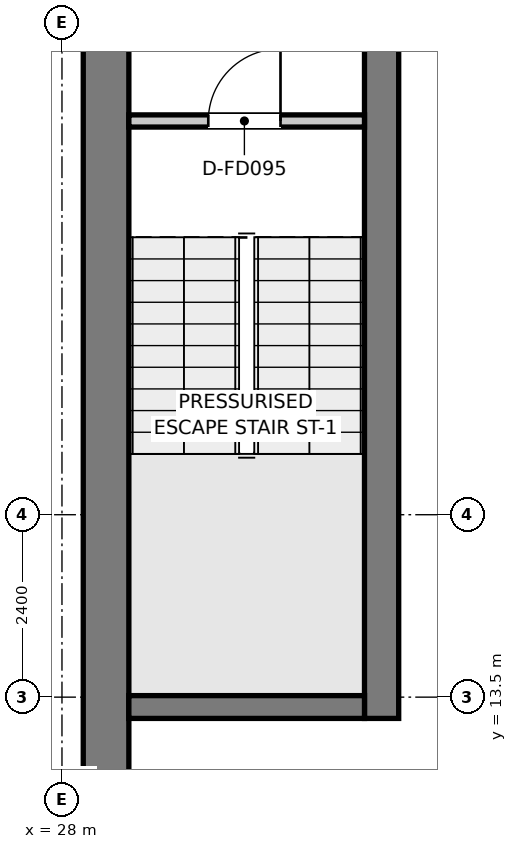
"""IFC4 building model, lengths in metres.
Left out: names, types, materials, properties, quantities, classifications, styles, units other than length and angle.
Written with IfcOpenShell. Run it as: python <this file> out.ifc"""

import sys

from ifc_helpers import new_model, si_unit, direction, frame, frame_2d, origin, place, context, subcontext, project, spatial, rectangle, extrude, element, fill, save


model = new_model("IFC4")
c1 = context("Model", 3, precision=1e-05, world=origin(), true_north=direction((0.0, 1.0)))
c2 = subcontext(c1, "Body", "Model", "MODEL_VIEW")
j1 = project(units=[si_unit("LENGTHUNIT", "METRE"), si_unit("PLANEANGLEUNIT", "RADIAN")], contexts=[c1])
p1 = place(None, origin())
s1 = spatial("IfcSite", under=j1, at=p1, CompositionType="ELEMENT")
p2 = place(p1, origin())
s2 = spatial("IfcBuilding", under=s1, at=p2, CompositionType="ELEMENT")
p3 = place(p2, frame((0.0, 0.0, 378.25)))
s3 = spatial("IfcBuildingStorey", under=s2, at=p3, CompositionType="ELEMENT", Elevation=378.25)
p4 = place(p3, frame((28.58, 11.1, 0.0), z_axis=(0.0, 0.0, 1.0), x_axis=(0.0, 1.0, 0.0)))
e1 = element("IfcWall", 1, at=p4, inside=s3, PredefinedType="SHEAR", context=c2, shape_type="SweptSolid", body=[
    extrude(rectangle(XDim=15.1, YDim=0.6, at=frame_2d((7.55, 0.0))), origin(), (0.0, 0.0, 1.0), 3.6),
])
p5 = place(p3, frame((32.205, 13.22, 0.0), z_axis=(0.0, 0.0, 1.0), x_axis=(0.0, 1.0, 0.0)))
e2 = element("IfcWall", 2, at=p5, inside=s3, PredefinedType="SHEAR", context=c2, shape_type="SweptSolid", body=[
    extrude(rectangle(XDim=12.98, YDim=0.45, at=frame_2d((6.49, 0.0))), origin(), (0.0, 0.0, 1.0), 3.6),
])
p6 = place(p5, frame((10.58, 0.0, 0.0)))
e3 = element("IfcOpeningElement", 3, at=p6, cuts=e2, PredefinedType="OPENING", context=c2, shape_type="SweptSolid", body=[
    extrude(rectangle(XDim=1.1, YDim=2.15, at=frame_2d((0.55, 1.075))), frame((0.0, 0.235, 0.0), z_axis=(0.0, -1.0, 0.0), x_axis=(1.0, 0.0, 0.0)), (0.0, 0.0, 1.0), 0.47),
])
p7 = place(p3, frame((28.88, 13.37, 0.0), z_axis=(0.0, 0.0, 1.0), x_axis=(1.0, 0.0, 0.0)))
e4 = element("IfcWall", 4, at=p7, inside=s3, PredefinedType="SHEAR", context=c2, shape_type="SweptSolid", body=[
    extrude(rectangle(XDim=3.1, YDim=0.3, at=frame_2d((1.55, 0.0))), origin(), (0.0, 0.0, 1.0), 3.6),
])
p8 = place(p3, frame((28.88, 21.08, 0.0), z_axis=(0.0, 0.0, 1.0), x_axis=(1.0, 0.0, 0.0)))
e5 = element("IfcWall", 5, at=p8, inside=s3, PredefinedType="PARTITIONING", context=c2, shape_type="SweptSolid", body=[
    extrude(rectangle(XDim=3.1, YDim=0.16, at=frame_2d((1.55, 0.0))), origin(), (0.0, 0.0, 1.0), 3.3),
])
p9 = place(p8, frame((1.045, 0.0, 0.0)))
e6 = element("IfcOpeningElement", 6, at=p9, cuts=e5, PredefinedType="OPENING", context=c2, shape_type="SweptSolid", body=[
    extrude(rectangle(XDim=0.95, YDim=2.1, at=frame_2d((0.475, 1.05))), frame((0.0, 0.09, 0.0), z_axis=(0.0, -1.0, 0.0), x_axis=(1.0, 0.0, 0.0)), (0.0, 0.0, 1.0), 0.18),
])
p10 = place(p9, origin())
e7 = element("IfcDoor", 7, at=p10, inside=s3, OperationType="SINGLE_SWING_RIGHT", PredefinedType="DOOR", context=c2, shape_type="SweptSolid", body=[
    extrude(rectangle(XDim=0.95, YDim=2.1, at=frame_2d((0.475, 1.05))), frame((0.0, 0.025, 0.0), z_axis=(0.0, -1.0, 0.0), x_axis=(1.0, 0.0, 0.0)), (0.0, 0.0, 1.0), 0.05),
])
fill(e6, e7)
save(model, sys.argv[1])
